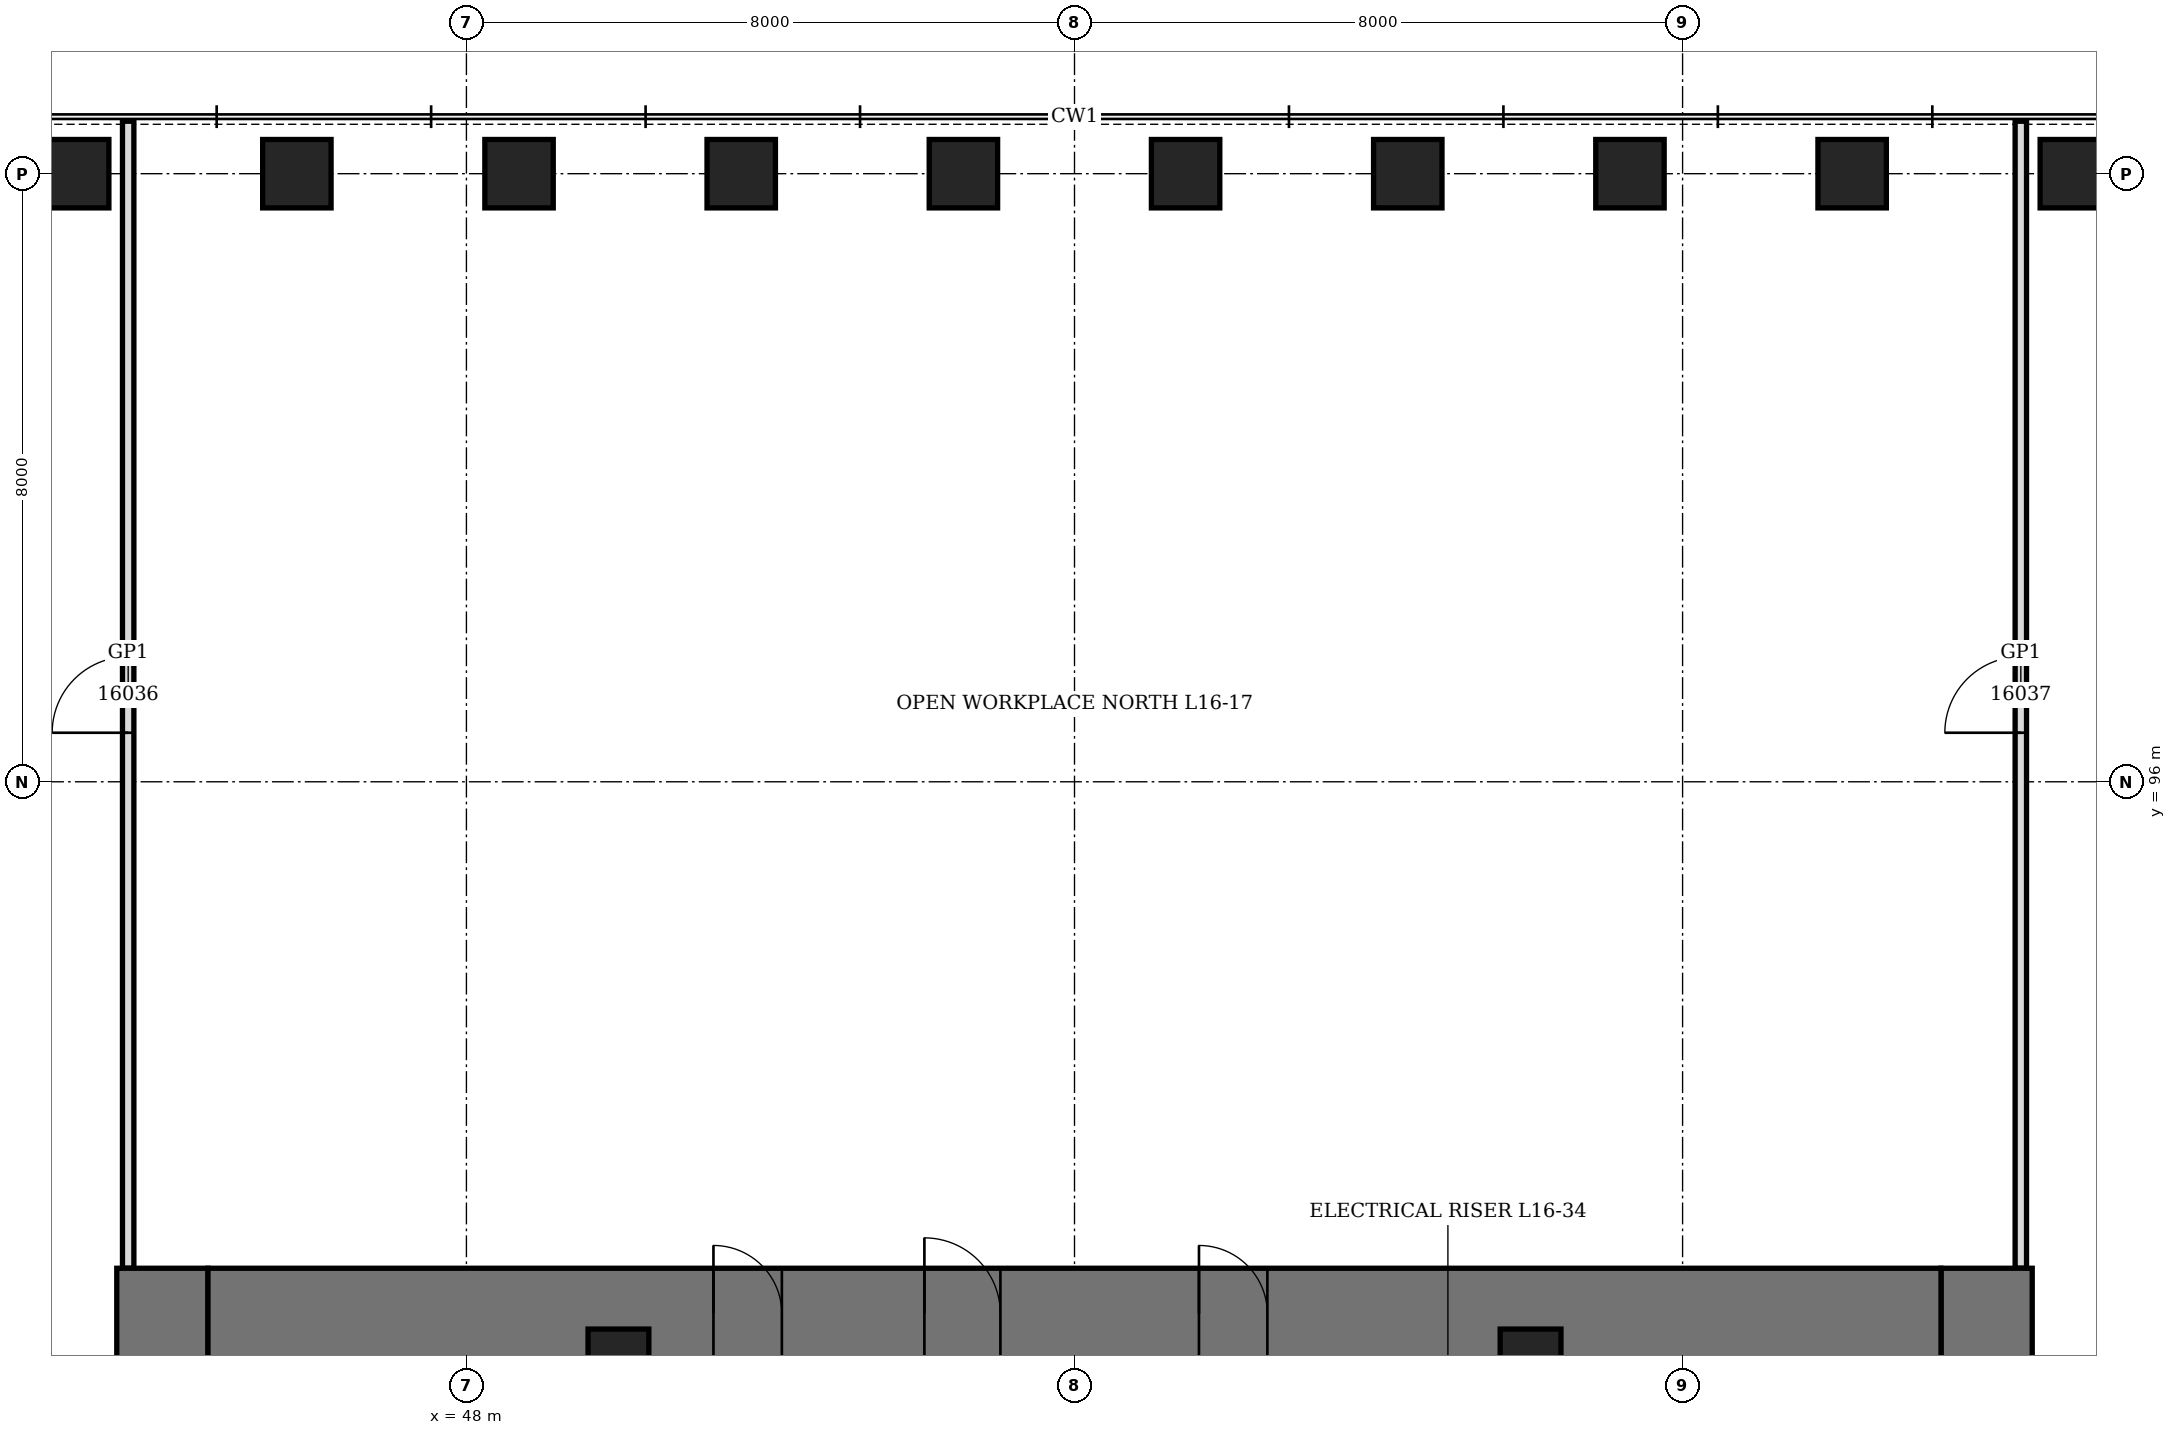
"""IFC4 building model, lengths in metres.
Left out: names, types, materials, properties, quantities, classifications, styles, units other than length and angle.
Written with IfcOpenShell. Run it as: python <this file> out.ifc"""

import sys

from ifc_helpers import new_model, si_unit, direction, frame, frame_2d, origin, origin_2d, place, context, subcontext, project, spatial, rectangle, hollow_rectangle, extrude, element, fill, save


model = new_model("IFC4")
c1 = context("Model", 3, precision=1e-05, world=origin(), true_north=direction((0.0, 1.0)))
c2 = subcontext(c1, "Body", "Model", "MODEL_VIEW")
j1 = project(units=[si_unit("LENGTHUNIT", "METRE"), si_unit("PLANEANGLEUNIT", "RADIAN")], contexts=[c1])
p1 = place(None, origin())
s1 = spatial("IfcSite", under=j1, at=p1, CompositionType="ELEMENT")
p2 = place(p1, origin())
s2 = spatial("IfcBuilding", under=s1, at=p2, CompositionType="ELEMENT")
p3 = place(p2, frame((0.0, 0.0, 76.9)))
s3 = spatial("IfcBuildingStorey", under=s2, at=p3, CompositionType="ELEMENT", Elevation=76.9)
for number, where, z_axis, x_axis in (
    (1, (69.154, 104.0, 0.0), (0.0, 0.0, 1.0), (1.0, 0.0, 0.0)),
    (2, (66.231, 104.0, 0.0), (0.0, 0.0, 1.0), (1.0, 0.0, 0.0)),
    (3, (63.308, 104.0, 0.0), (0.0, 0.0, 1.0), (1.0, 0.0, 0.0)),
    (4, (60.385, 104.0, 0.0), (0.0, 0.0, 1.0), (1.0, 0.0, 0.0)),
    (5, (57.461, 104.0, 0.0), (0.0, 0.0, 1.0), (1.0, 0.0, 0.0)),
    (6, (54.539, 104.0, 0.0), (0.0, 0.0, 1.0), (1.0, 0.0, 0.0)),
    (7, (51.615, 104.0, 0.0), (0.0, 0.0, 1.0), (1.0, 0.0, 0.0)),
    (8, (48.692, 104.0, 0.0), (0.0, 0.0, 1.0), (1.0, 0.0, 0.0)),
    (9, (45.769, 104.0, 0.0), (0.0, 0.0, 1.0), (1.0, 0.0, 0.0)),
    (10, (42.846, 104.0, 0.0), (0.0, 0.0, 1.0), (1.0, 0.0, 0.0)),
):
    element("IfcColumn", number, at=place(p3, frame(where, z_axis=z_axis, x_axis=x_axis)), inside=s3, PredefinedType="COLUMN", context=c2, shape_type="SweptSolid", body=[
        extrude(hollow_rectangle(XDim=0.9, YDim=0.9, WallThickness=0.12, at=origin_2d()), origin(), (0.0, 0.0, 1.0), 4.2),
    ])
p4 = place(p3, frame((44.0, 70.4, 0.0), z_axis=(0.0, 0.0, 1.0), x_axis=(0.0, 1.0, 0.0)))
e11 = element("IfcWall", 11, at=p4, inside=s3, PredefinedType="SHEAR", context=c2, shape_type="SweptSolid", body=[
    extrude(rectangle(XDim=19.2, YDim=1.2, at=frame_2d((9.6, 0.0))), origin(), (0.0, 0.0, 1.0), 4.2),
])
p5 = place(p4, frame((8.6, 0.0, 0.0)))
e12 = element("IfcOpeningElement", 12, at=p5, cuts=e11, PredefinedType="OPENING", context=c2, shape_type="SweptSolid", body=[
    extrude(rectangle(XDim=2.0, YDim=2.4, at=frame_2d((1.0, 1.2))), frame((0.0, 0.61, 0.0), z_axis=(0.0, -1.0, 0.0), x_axis=(1.0, 0.0, 0.0)), (0.0, 0.0, 1.0), 1.22),
])
p6 = place(p3, frame((68.0, 70.4, 0.0), z_axis=(0.0, 0.0, 1.0), x_axis=(0.0, 1.0, 0.0)))
e13 = element("IfcWall", 13, at=p6, inside=s3, PredefinedType="SHEAR", context=c2, shape_type="SweptSolid", body=[
    extrude(rectangle(XDim=19.2, YDim=1.2, at=frame_2d((9.6, 0.0))), origin(), (0.0, 0.0, 1.0), 4.2),
])
p7 = place(p6, frame((8.6, 0.0, 0.0)))
e14 = element("IfcOpeningElement", 14, at=p7, cuts=e13, PredefinedType="OPENING", context=c2, shape_type="SweptSolid", body=[
    extrude(rectangle(XDim=2.0, YDim=2.4, at=frame_2d((1.0, 1.2))), frame((0.0, 0.61, 0.0), z_axis=(0.0, -1.0, 0.0), x_axis=(1.0, 0.0, 0.0)), (0.0, 0.0, 1.0), 1.22),
])
p8 = place(p3, frame((44.6, 89.0, 0.0), z_axis=(0.0, 0.0, 1.0), x_axis=(1.0, 0.0, 0.0)))
e15 = element("IfcWall", 15, at=p8, inside=s3, PredefinedType="SHEAR", context=c2, shape_type="SweptSolid", body=[
    extrude(rectangle(XDim=22.8, YDim=1.2, at=frame_2d((11.4, 0.0))), origin(), (0.0, 0.0, 1.0), 4.2),
])
p9 = place(p8, frame((9.425, 0.0, 0.0)))
e16 = element("IfcOpeningElement", 16, at=p9, cuts=e15, PredefinedType="OPENING", context=c2, shape_type="SweptSolid", body=[
    extrude(rectangle(XDim=1.0, YDim=2.1, at=frame_2d((0.5, 1.05))), frame((0.0, 0.61, 0.0), z_axis=(0.0, -1.0, 0.0), x_axis=(1.0, 0.0, 0.0)), (0.0, 0.0, 1.0), 1.22),
])
p10 = place(p8, frame((6.65, 0.0, 0.0)))
e17 = element("IfcOpeningElement", 17, at=p10, cuts=e15, PredefinedType="OPENING", context=c2, shape_type="SweptSolid", body=[
    extrude(rectangle(XDim=0.9, YDim=2.1, at=frame_2d((0.45, 1.05))), frame((0.0, 0.61, 0.0), z_axis=(0.0, -1.0, 0.0), x_axis=(1.0, 0.0, 0.0)), (0.0, 0.0, 1.0), 1.22),
])
p11 = place(p8, frame((13.038, 0.0, 0.0)))
e18 = element("IfcOpeningElement", 18, at=p11, cuts=e15, PredefinedType="OPENING", context=c2, shape_type="SweptSolid", body=[
    extrude(rectangle(XDim=0.9, YDim=2.1, at=frame_2d((0.45, 1.05))), frame((0.0, 0.61, 0.0), z_axis=(0.0, -1.0, 0.0), x_axis=(1.0, 0.0, 0.0)), (0.0, 0.0, 1.0), 1.22),
])
for number, where, z_axis, x_axis in (
    (19, (50.0, 88.4, 0.0), (0.0, 0.0, 1.0), (1.0, 0.0, 0.0)),
    (20, (62.0, 88.4, 0.0), (0.0, 0.0, 1.0), (1.0, 0.0, 0.0)),
):
    element("IfcColumn", number, at=place(p3, frame(where, z_axis=z_axis, x_axis=x_axis)), inside=s3, PredefinedType="COLUMN", context=c2, shape_type="SweptSolid", body=[
        extrude(hollow_rectangle(XDim=0.8, YDim=0.8, WallThickness=0.1, at=origin_2d()), origin(), (0.0, 0.0, 1.0), 4.2),
    ])
p12 = place(p3, frame((43.55, 89.6, 0.0), z_axis=(0.0, 0.0, 1.0), x_axis=(0.0, 1.0, 0.0)))
e21 = element("IfcWall", 21, at=p12, inside=s3, PredefinedType="PARTITIONING", context=c2, shape_type="SweptSolid", body=[
    extrude(rectangle(XDim=15.09, YDim=0.15, at=frame_2d((7.545, 0.0))), origin(), (0.0, 0.0, 1.0), 4.04),
])
p13 = place(p12, frame((7.045, 0.0, 0.0)))
e22 = element("IfcOpeningElement", 22, at=p13, cuts=e21, PredefinedType="OPENING", context=c2, shape_type="SweptSolid", body=[
    extrude(rectangle(XDim=1.0, YDim=2.4, at=frame_2d((0.5, 1.2))), frame((0.0, 0.085, 0.0), z_axis=(0.0, -1.0, 0.0), x_axis=(1.0, 0.0, 0.0)), (0.0, 0.0, 1.0), 0.17),
])
p14 = place(p3, frame((68.45, 89.6, 0.0), z_axis=(0.0, 0.0, 1.0), x_axis=(0.0, 1.0, 0.0)))
e23 = element("IfcWall", 23, at=p14, inside=s3, PredefinedType="PARTITIONING", context=c2, shape_type="SweptSolid", body=[
    extrude(rectangle(XDim=15.09, YDim=0.15, at=frame_2d((7.545, 0.0))), origin(), (0.0, 0.0, 1.0), 4.04),
])
p15 = place(p14, frame((7.045, 0.0, 0.0)))
e24 = element("IfcOpeningElement", 24, at=p15, cuts=e23, PredefinedType="OPENING", context=c2, shape_type="SweptSolid", body=[
    extrude(rectangle(XDim=1.0, YDim=2.4, at=frame_2d((0.5, 1.2))), frame((0.0, 0.085, 0.0), z_axis=(0.0, -1.0, 0.0), x_axis=(1.0, 0.0, 0.0)), (0.0, 0.0, 1.0), 0.17),
])
p16 = place(p9, origin())
e25 = element("IfcDoor", 25, at=p16, inside=s3, OperationType="SINGLE_SWING_LEFT", PredefinedType="DOOR", context=c2, shape_type="SweptSolid", body=[
    extrude(rectangle(XDim=1.0, YDim=2.1, at=frame_2d((0.5, 1.05))), frame((0.0, 0.35, 0.0), z_axis=(0.0, -1.0, 0.0), x_axis=(1.0, 0.0, 0.0)), (0.0, 0.0, 1.0), 0.7),
])
fill(e16, e25)
p17 = place(p10, origin())
e26 = element("IfcDoor", 26, at=p17, inside=s3, OperationType="SINGLE_SWING_LEFT", PredefinedType="DOOR", context=c2, shape_type="SweptSolid", body=[
    extrude(rectangle(XDim=0.9, YDim=2.1, at=frame_2d((0.45, 1.05))), frame((0.0, 0.35, 0.0), z_axis=(0.0, -1.0, 0.0), x_axis=(1.0, 0.0, 0.0)), (0.0, 0.0, 1.0), 0.7),
])
fill(e17, e26)
p18 = place(p11, origin())
e27 = element("IfcDoor", 27, at=p18, inside=s3, OperationType="SINGLE_SWING_LEFT", PredefinedType="DOOR", context=c2, shape_type="SweptSolid", body=[
    extrude(rectangle(XDim=0.9, YDim=2.1, at=frame_2d((0.45, 1.05))), frame((0.0, 0.35, 0.0), z_axis=(0.0, -1.0, 0.0), x_axis=(1.0, 0.0, 0.0)), (0.0, 0.0, 1.0), 0.7),
])
fill(e18, e27)
p19 = place(p13, origin())
e28 = element("IfcDoor", 28, at=p19, inside=s3, OperationType="SINGLE_SWING_RIGHT", PredefinedType="DOOR", context=c2, shape_type="SweptSolid", body=[
    extrude(rectangle(XDim=1.0, YDim=2.4, at=frame_2d((0.5, 1.2))), frame((0.0, 0.075, 0.0), z_axis=(0.0, -1.0, 0.0), x_axis=(1.0, 0.0, 0.0)), (0.0, 0.0, 1.0), 0.149),
])
fill(e22, e28)
p20 = place(p15, origin())
e29 = element("IfcDoor", 29, at=p20, inside=s3, OperationType="SINGLE_SWING_RIGHT", PredefinedType="DOOR", context=c2, shape_type="SweptSolid", body=[
    extrude(rectangle(XDim=1.0, YDim=2.4, at=frame_2d((0.5, 1.2))), frame((0.0, 0.075, 0.0), z_axis=(0.0, -1.0, 0.0), x_axis=(1.0, 0.0, 0.0)), (0.0, 0.0, 1.0), 0.149),
])
fill(e24, e29)
save(model, sys.argv[1])
